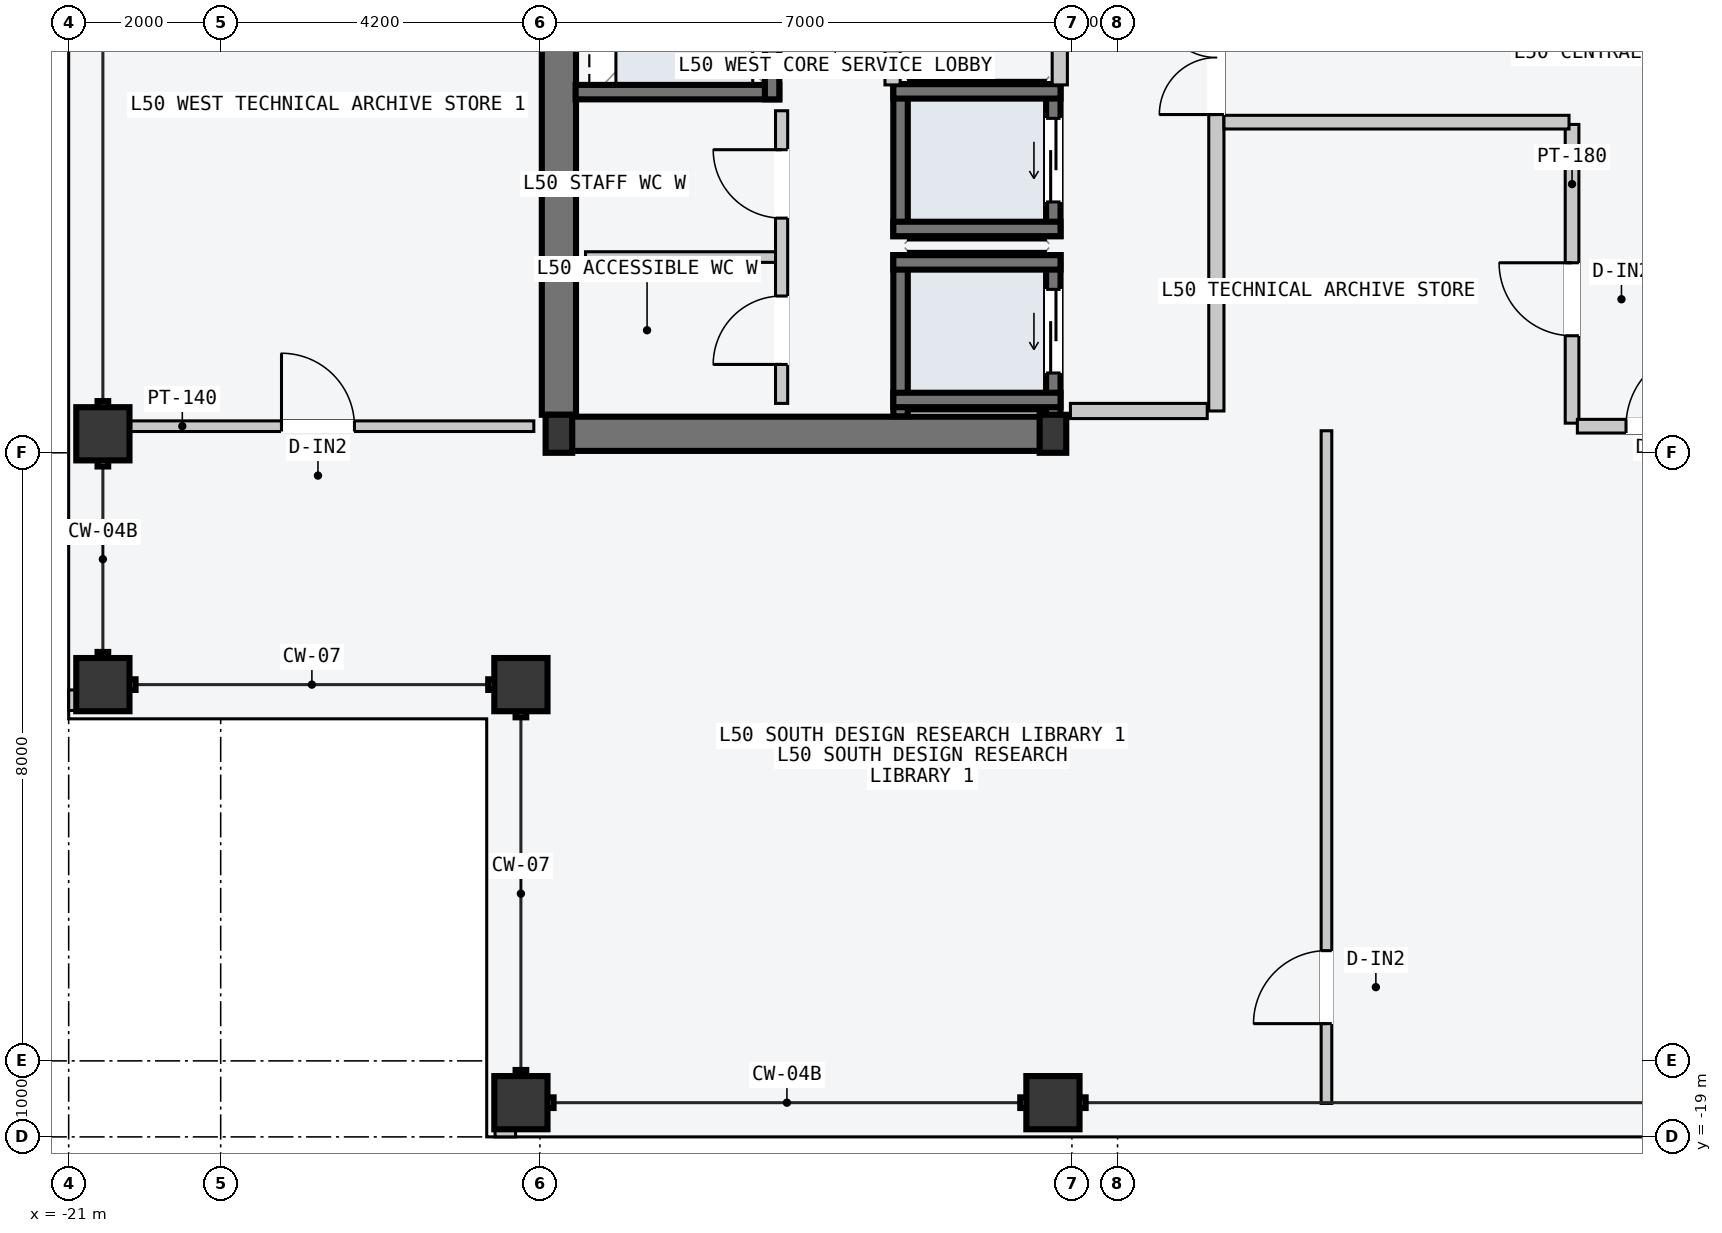
"""IFC4 building model, lengths in metres.
Left out: names, types, materials, properties, quantities, classifications, styles, units other than length and angle.
Written with IfcOpenShell. Run it as: python <this file> out.ifc"""

import sys

from ifc_helpers import new_model, si_unit, direction, frame, frame_2d, origin, origin_2d, place, context, subcontext, project, spatial, rectangle, hollow_rectangle, i_section, extrude, element, fill, save


model = new_model("IFC4")
c1 = context("Model", 3, precision=1e-05, world=origin(), true_north=direction((0.0, 1.0)))
c2 = subcontext(c1, "Body", "Model", "MODEL_VIEW")
j1 = project(units=[si_unit("LENGTHUNIT", "METRE"), si_unit("PLANEANGLEUNIT", "RADIAN")], contexts=[c1])
p1 = place(None, origin())
s1 = spatial("IfcSite", under=j1, at=p1, CompositionType="ELEMENT")
p2 = place(p1, origin())
s2 = spatial("IfcBuilding", under=s1, at=p2, CompositionType="ELEMENT")
p3 = place(p2, frame((0.0, 0.0, 191.1)))
s3 = spatial("IfcBuildingStorey", under=s2, at=p3, CompositionType="ELEMENT", Elevation=191.1)
p4 = place(p3, frame((-14.53, -9.75, -0.2), z_axis=(0.0, 0.0, 1.0), x_axis=(1.0, 0.0, 0.0)))
e1 = element("IfcWall", 1, at=p4, inside=s3, PredefinedType="SHEAR", context=c2, shape_type="SweptSolid", body=[
    extrude(rectangle(XDim=6.46, YDim=0.45, at=frame_2d((3.23, 0.0))), origin(), (0.0, 0.0, 1.0), 3.6),
])
p5 = place(p3, frame((-14.55, -9.5, -0.2), z_axis=(0.0, 0.0, 1.0), x_axis=(0.0, 1.0, 0.0)))
e2 = element("IfcWall", 2, at=p5, inside=s3, PredefinedType="SHEAR", context=c2, shape_type="SweptSolid", body=[
    extrude(rectangle(XDim=9.25, YDim=0.45, at=frame_2d((4.625, 0.0))), origin(), (0.0, 0.0, 1.0), 3.6),
])
for number, where, z_axis, x_axis in (
    (3, (-14.55, -9.75, 0.0), (0.0, 0.0, 1.0), (1.0, 0.0, 0.0)),
    (4, (-8.05, -9.75, 0.0), (0.0, 0.0, 1.0), (1.0, 0.0, 0.0)),
):
    element("IfcColumn", number, at=place(p3, frame(where, z_axis=z_axis, x_axis=x_axis)), inside=s3, PredefinedType="COLUMN", context=c2, shape_type="SweptSolid", body=[
        extrude(i_section(OverallWidth=0.35, OverallDepth=0.5, WebThickness=0.02, FlangeThickness=0.032, at=origin_2d()), origin(), (0.0, 0.0, 1.0), 3.6),
    ])
for number, where, z_axis, x_axis in (
    (5, (-15.05, -18.55, 0.0), (0.0, 0.0, 1.0), (1.0, 0.0, 0.0)),
    (6, (-8.05, -18.55, 0.0), (0.0, 0.0, 1.0), (1.0, 0.0, 0.0)),
    (7, (-20.55, -13.05, 0.0), (0.0, 0.0, 1.0), (0.0, 1.0, 0.0)),
    (8, (-20.55, -9.75, 0.0), (0.0, 0.0, 1.0), (0.0, 1.0, 0.0)),
    (9, (-15.05, -13.05, 0.0), (0.0, 0.0, 1.0), (1.0, 0.0, 0.0)),
):
    element("IfcColumn", number, at=place(p3, frame(where, z_axis=z_axis, x_axis=x_axis)), inside=s3, PredefinedType="COLUMN", context=c2, shape_type="SweptSolid", body=[
        extrude(hollow_rectangle(XDim=0.7, YDim=0.7, WallThickness=0.03, at=origin_2d()), origin(), (0.0, 0.0, 1.0), 3.6),
    ])
for number, where, z_axis, x_axis in (
    (10, (-15.39, -18.89, 0.0), (0.0, 0.0, 1.0), (1.0, 0.0, 0.0)),
    (11, (-20.89, -13.39, 0.0), (0.0, 0.0, 1.0), (0.0, 1.0, 0.0)),
):
    element("IfcWall", number, at=place(p3, frame(where, z_axis=z_axis, x_axis=x_axis)), inside=s3, PredefinedType="PARAPET", context=c2, shape_type="SweptSolid", body=[
        extrude(rectangle(XDim=0.27, YDim=0.22, at=frame_2d((0.135, 0.0))), origin(), (0.0, 0.0, 1.0), 1.2),
    ])
p6 = place(p3, frame((-8.045, -9.52, -0.2), z_axis=(0.0, 0.0, 1.0), x_axis=(0.0, 1.0, 0.0)))
e12 = element("IfcWall", 12, at=p6, inside=s3, PredefinedType="SOLIDWALL", context=c2, shape_type="SweptSolid", body=[
    extrude(rectangle(XDim=2.12, YDim=0.19, at=frame_2d((1.06, 0.0))), origin(), (0.0, 0.0, 1.0), 3.6),
])
p7 = place(p6, frame((0.57, 0.0, 0.2)))
e13 = element("IfcOpeningElement", 13, at=p7, cuts=e12, PredefinedType="OPENING", context=c2, shape_type="SweptSolid", body=[
    extrude(rectangle(XDim=1.1, YDim=2.2, at=frame_2d((0.55, 1.1))), frame((0.0, 0.105, 0.0), z_axis=(0.0, -1.0, 0.0), x_axis=(1.0, 0.0, 0.0)), (0.0, 0.0, 1.0), 0.21),
])
p8 = place(p3, frame((-10.055, -9.52, -0.2), z_axis=(0.0, 0.0, 1.0), x_axis=(0.0, 1.0, 0.0)))
e14 = element("IfcWall", 14, at=p8, inside=s3, PredefinedType="SOLIDWALL", context=c2, shape_type="SweptSolid", body=[
    extrude(rectangle(XDim=2.12, YDim=0.19, at=frame_2d((1.06, 0.0))), origin(), (0.0, 0.0, 1.0), 3.6),
])
for number, where, z_axis, x_axis in (
    (15, (-10.15, -7.495, -0.2), (0.0, 0.0, 1.0), (1.0, 0.0, 0.0)),
    (16, (-10.15, -9.305, -0.2), (0.0, 0.0, 1.0), (1.0, 0.0, 0.0)),
):
    element("IfcWall", number, at=place(p3, frame(where, z_axis=z_axis, x_axis=x_axis)), inside=s3, PredefinedType="SOLIDWALL", context=c2, shape_type="SweptSolid", body=[
        extrude(rectangle(XDim=2.2, YDim=0.19, at=frame_2d((1.1, 0.0))), origin(), (0.0, 0.0, 1.0), 3.6),
    ])
p9 = place(p3, frame((-8.045, -7.15, -0.2), z_axis=(0.0, 0.0, 1.0), x_axis=(0.0, 1.0, 0.0)))
e17 = element("IfcWall", 17, at=p9, inside=s3, PredefinedType="SOLIDWALL", context=c2, shape_type="SweptSolid", body=[
    extrude(rectangle(XDim=2.0, YDim=0.19, at=frame_2d((1.0, 0.0))), origin(), (0.0, 0.0, 1.0), 3.6),
])
p10 = place(p9, frame((0.45, 0.0, 0.2)))
e18 = element("IfcOpeningElement", 18, at=p10, cuts=e17, PredefinedType="OPENING", context=c2, shape_type="SweptSolid", body=[
    extrude(rectangle(XDim=1.1, YDim=2.2, at=frame_2d((0.55, 1.1))), frame((0.0, 0.105, 0.0), z_axis=(0.0, -1.0, 0.0), x_axis=(1.0, 0.0, 0.0)), (0.0, 0.0, 1.0), 0.21),
])
p11 = place(p3, frame((-10.055, -7.15, -0.2), z_axis=(0.0, 0.0, 1.0), x_axis=(0.0, 1.0, 0.0)))
e19 = element("IfcWall", 19, at=p11, inside=s3, PredefinedType="SOLIDWALL", context=c2, shape_type="SweptSolid", body=[
    extrude(rectangle(XDim=2.0, YDim=0.19, at=frame_2d((1.0, 0.0))), origin(), (0.0, 0.0, 1.0), 3.6),
])
for number, where, z_axis, x_axis in (
    (20, (-10.15, -5.245, -0.2), (0.0, 0.0, 1.0), (1.0, 0.0, 0.0)),
    (21, (-10.15, -7.055, -0.2), (0.0, 0.0, 1.0), (1.0, 0.0, 0.0)),
):
    element("IfcWall", number, at=place(p3, frame(where, z_axis=z_axis, x_axis=x_axis)), inside=s3, PredefinedType="SOLIDWALL", context=c2, shape_type="SweptSolid", body=[
        extrude(rectangle(XDim=2.2, YDim=0.19, at=frame_2d((1.1, 0.0))), origin(), (0.0, 0.0, 1.0), 3.6),
    ])
p12 = place(p3, frame((-14.33, -5.255, -0.2), z_axis=(0.0, 0.0, 1.0), x_axis=(1.0, 0.0, 0.0)))
e22 = element("IfcWall", 22, at=p12, inside=s3, PredefinedType="SOLIDWALL", context=c2, shape_type="SweptSolid", body=[
    extrude(rectangle(XDim=2.68, YDim=0.19, at=frame_2d((1.34, 0.0))), origin(), (0.0, 0.0, 1.0), 3.6),
])
p13 = place(p3, frame((-11.745, -5.35, -0.2), z_axis=(0.0, 0.0, 1.0), x_axis=(0.0, 1.0, 0.0)))
e23 = element("IfcWall", 23, at=p13, inside=s3, PredefinedType="SOLIDWALL", context=c2, shape_type="SweptSolid", body=[
    extrude(rectangle(XDim=2.6, YDim=0.19, at=frame_2d((1.3, 0.0))), origin(), (0.0, 0.0, 1.0), 3.6),
])
p14 = place(p3, frame((-5.9, -9.45, 0.0), z_axis=(0.0, 0.0, 1.0), x_axis=(0.0, 1.0, 0.0)))
e24 = element("IfcWall", 24, at=p14, inside=s3, PredefinedType="PARTITIONING", context=c2, shape_type="SweptSolid", body=[
    extrude(rectangle(XDim=10.5, YDim=0.2, at=frame_2d((5.25, 0.0))), origin(), (0.0, 0.0, 1.0), 3.4),
])
p15 = place(p14, frame((3.9, 0.0, 0.0)))
e25 = element("IfcOpeningElement", 25, at=p15, cuts=e24, PredefinedType="OPENING", context=c2, shape_type="SweptSolid", body=[
    extrude(rectangle(XDim=1.5, YDim=2.2, at=frame_2d((0.75, 1.1))), frame((0.0, 0.11, 0.0), z_axis=(0.0, -1.0, 0.0), x_axis=(1.0, 0.0, 0.0)), (0.0, 0.0, 1.0), 0.22),
])
p16 = place(p3, frame((-6.02, -9.45, 0.0), z_axis=(0.0, 0.0, 1.0), x_axis=(-1.0, 0.0, 0.0)))
e26 = element("IfcWall", 26, at=p16, inside=s3, PredefinedType="PARTITIONING", context=c2, shape_type="SweptSolid", body=[
    extrude(rectangle(XDim=1.8, YDim=0.2, at=frame_2d((0.9, 0.0))), origin(), (0.0, 0.0, 1.0), 3.4),
])
for number, where, z_axis, x_axis in (
    (27, (-7.96, -5.16, 0.0), (0.0, 0.0, 1.0), (0.0, 1.0, 0.0)),
    (28, (-10.16, -5.16, 0.0), (0.0, 0.0, 1.0), (0.0, 1.0, 0.0)),
):
    element("IfcWall", number, at=place(p3, frame(where, z_axis=z_axis, x_axis=x_axis)), inside=s3, PredefinedType="PARTITIONING", context=c2, shape_type="SweptSolid", body=[
        extrude(rectangle(XDim=2.44, YDim=0.2, at=frame_2d((1.22, 0.0))), origin(), (0.0, 0.0, 1.0), 3.4),
    ])
p17 = place(p3, frame((-11.7, -7.425, 0.0), z_axis=(0.0, 0.0, 1.0), x_axis=(-1.0, 0.0, 0.0)))
e29 = element("IfcWall", 29, at=p17, inside=s3, PredefinedType="PARTITIONING", context=c2, shape_type="SweptSolid", body=[
    extrude(rectangle(XDim=2.5, YDim=0.14, at=frame_2d((1.25, 0.0))), origin(), (0.0, 0.0, 1.0), 3.4),
])
p18 = place(p3, frame((-11.62, -9.35, 0.0), z_axis=(0.0, 0.0, 1.0), x_axis=(0.0, 1.0, 0.0)))
e30 = element("IfcWall", 30, at=p18, inside=s3, PredefinedType="PARTITIONING", context=c2, shape_type="SweptSolid", body=[
    extrude(rectangle(XDim=3.85, YDim=0.16, at=frame_2d((1.925, 0.0))), origin(), (0.0, 0.0, 1.0), 3.4),
])
p19 = place(p18, frame((0.512, 0.0, 0.0)))
e31 = element("IfcOpeningElement", 31, at=p19, cuts=e30, PredefinedType="OPENING", context=c2, shape_type="SweptSolid", body=[
    extrude(rectangle(XDim=0.9, YDim=2.15, at=frame_2d((0.45, 1.075))), frame((0.0, 0.09, 0.0), z_axis=(0.0, -1.0, 0.0), x_axis=(1.0, 0.0, 0.0)), (0.0, 0.0, 1.0), 0.18),
])
p20 = place(p18, frame((2.438, 0.0, 0.0)))
e32 = element("IfcOpeningElement", 32, at=p20, cuts=e30, PredefinedType="OPENING", context=c2, shape_type="SweptSolid", body=[
    extrude(rectangle(XDim=0.9, YDim=2.15, at=frame_2d((0.45, 1.075))), frame((0.0, 0.09, 0.0), z_axis=(0.0, -1.0, 0.0), x_axis=(1.0, 0.0, 0.0)), (0.0, 0.0, 1.0), 0.18),
])
p21 = place(p3, frame((-1.22, -9.61, 0.0), z_axis=(0.0, 0.0, 1.0), x_axis=(0.0, 1.0, 0.0)))
e33 = element("IfcWall", 33, at=p21, inside=s3, PredefinedType="PARTITIONING", context=c2, shape_type="SweptSolid", body=[
    extrude(rectangle(XDim=3.93, YDim=0.18, at=frame_2d((1.965, 0.0))), origin(), (0.0, 0.0, 1.0), 3.4),
])
p22 = place(p21, frame((1.15, 0.0, 0.0)))
e34 = element("IfcOpeningElement", 34, at=p22, cuts=e33, PredefinedType="OPENING", context=c2, shape_type="SweptSolid", body=[
    extrude(rectangle(XDim=0.96, YDim=2.18, at=frame_2d((0.48, 1.09))), frame((0.0, 0.1, 0.0), z_axis=(0.0, -1.0, 0.0), x_axis=(1.0, 0.0, 0.0)), (0.0, 0.0, 1.0), 0.2),
])
p23 = place(p3, frame((-5.8, -5.65, 0.0), z_axis=(0.0, 0.0, 1.0), x_axis=(1.0, 0.0, 0.0)))
e35 = element("IfcWall", 35, at=p23, inside=s3, PredefinedType="PARTITIONING", context=c2, shape_type="SweptSolid", body=[
    extrude(rectangle(XDim=4.54, YDim=0.18, at=frame_2d((2.27, 0.0))), origin(), (0.0, 0.0, 1.0), 3.4),
])
p24 = place(p3, frame((-4.451, -18.56, 0.0), z_axis=(0.0, 0.0, 1.0), x_axis=(0.0, 1.0, 0.0)))
e36 = element("IfcWall", 36, at=p24, inside=s3, PredefinedType="PARTITIONING", context=c2, shape_type="SweptSolid", body=[
    extrude(rectangle(XDim=8.85, YDim=0.14, at=frame_2d((4.425, 0.0))), origin(), (0.0, 0.0, 1.0), 3.4),
])
p25 = place(p24, frame((1.05, 0.0, 0.0)))
e37 = element("IfcOpeningElement", 37, at=p25, cuts=e36, PredefinedType="OPENING", context=c2, shape_type="SweptSolid", body=[
    extrude(rectangle(XDim=0.96, YDim=2.18, at=frame_2d((0.48, 1.09))), frame((0.0, 0.08, 0.0), z_axis=(0.0, -1.0, 0.0), x_axis=(1.0, 0.0, 0.0)), (0.0, 0.0, 1.0), 0.16),
])
p26 = place(p3, frame((-1.15, -9.65, 0.0), z_axis=(0.0, 0.0, 1.0), x_axis=(1.0, 0.0, 0.0)))
e38 = element("IfcWall", 38, at=p26, inside=s3, PredefinedType="PARTITIONING", context=c2, shape_type="SweptSolid", body=[
    extrude(rectangle(XDim=2.3, YDim=0.18, at=frame_2d((1.15, 0.0))), origin(), (0.0, 0.0, 1.0), 2.75),
])
p27 = place(p26, frame((0.64, 0.0, 0.0)))
e39 = element("IfcOpeningElement", 39, at=p27, cuts=e38, PredefinedType="OPENING", context=c2, shape_type="SweptSolid", body=[
    extrude(rectangle(XDim=1.02, YDim=2.2, at=frame_2d((0.51, 1.1))), frame((0.0, 0.1, 0.0), z_axis=(0.0, -1.0, 0.0), x_axis=(1.0, 0.0, 0.0)), (0.0, 0.0, 1.0), 0.2),
])
p28 = place(p3, frame((-20.56, -9.65, 0.0), z_axis=(0.0, 0.0, 1.0), x_axis=(1.0, 0.0, 0.0)))
e40 = element("IfcWall", 40, at=p28, inside=s3, PredefinedType="PARTITIONING", context=c2, shape_type="SweptSolid", body=[
    extrude(rectangle(XDim=5.68, YDim=0.14, at=frame_2d((2.84, 0.0))), origin(), (0.0, 0.0, 1.0), 2.75),
])
p29 = place(p28, frame((2.36, 0.0, 0.0)))
e41 = element("IfcOpeningElement", 41, at=p29, cuts=e40, PredefinedType="OPENING", context=c2, shape_type="SweptSolid", body=[
    extrude(rectangle(XDim=0.96, YDim=2.18, at=frame_2d((0.48, 1.09))), frame((0.0, 0.08, 0.0), z_axis=(0.0, -1.0, 0.0), x_axis=(1.0, 0.0, 0.0)), (0.0, 0.0, 1.0), 0.16),
])
p30 = place(p7, origin())
e42 = element("IfcDoor", 42, at=p30, inside=s3, OperationType="SLIDING_TO_LEFT", PredefinedType="DOOR", context=c2, shape_type="SweptSolid", body=[
    extrude(rectangle(XDim=1.1, YDim=2.2, at=frame_2d((0.55, 1.1))), frame((0.0, 0.025, 0.0), z_axis=(0.0, -1.0, 0.0), x_axis=(1.0, 0.0, 0.0)), (0.0, 0.0, 1.0), 0.05),
])
fill(e13, e42)
p31 = place(p10, origin())
e43 = element("IfcDoor", 43, at=p31, inside=s3, OperationType="SLIDING_TO_LEFT", PredefinedType="DOOR", context=c2, shape_type="SweptSolid", body=[
    extrude(rectangle(XDim=1.1, YDim=2.2, at=frame_2d((0.55, 1.1))), frame((0.0, 0.025, 0.0), z_axis=(0.0, -1.0, 0.0), x_axis=(1.0, 0.0, 0.0)), (0.0, 0.0, 1.0), 0.05),
])
fill(e18, e43)
p32 = place(p15, origin())
e44 = element("IfcDoor", 44, at=p32, inside=s3, OperationType="DOUBLE_DOOR_SINGLE_SWING", PredefinedType="DOOR", context=c2, shape_type="SweptSolid", body=[
    extrude(rectangle(XDim=1.5, YDim=2.2, at=frame_2d((0.75, 1.1))), frame((0.0, 0.025, 0.0), z_axis=(0.0, -1.0, 0.0), x_axis=(1.0, 0.0, 0.0)), (0.0, 0.0, 1.0), 0.05),
])
fill(e25, e44)
p33 = place(p19, origin())
e45 = element("IfcDoor", 45, at=p33, inside=s3, OperationType="SINGLE_SWING_LEFT", PredefinedType="DOOR", context=c2, shape_type="SweptSolid", body=[
    extrude(rectangle(XDim=0.9, YDim=2.15, at=frame_2d((0.45, 1.075))), frame((0.0, 0.025, 0.0), z_axis=(0.0, -1.0, 0.0), x_axis=(1.0, 0.0, 0.0)), (0.0, 0.0, 1.0), 0.05),
])
fill(e31, e45)
p34 = place(p20, origin())
e46 = element("IfcDoor", 46, at=p34, inside=s3, OperationType="SINGLE_SWING_RIGHT", PredefinedType="DOOR", context=c2, shape_type="SweptSolid", body=[
    extrude(rectangle(XDim=0.9, YDim=2.15, at=frame_2d((0.45, 1.075))), frame((0.0, 0.025, 0.0), z_axis=(0.0, -1.0, 0.0), x_axis=(1.0, 0.0, 0.0)), (0.0, 0.0, 1.0), 0.05),
])
fill(e32, e46)
p35 = place(p22, origin())
e47 = element("IfcDoor", 47, at=p35, inside=s3, OperationType="SINGLE_SWING_RIGHT", PredefinedType="DOOR", context=c2, shape_type="SweptSolid", body=[
    extrude(rectangle(XDim=0.96, YDim=2.18, at=frame_2d((0.48, 1.09))), frame((0.0, 0.025, 0.0), z_axis=(0.0, -1.0, 0.0), x_axis=(1.0, 0.0, 0.0)), (0.0, 0.0, 1.0), 0.05),
])
fill(e34, e47)
p36 = place(p25, origin())
e48 = element("IfcDoor", 48, at=p36, inside=s3, OperationType="SINGLE_SWING_LEFT", PredefinedType="DOOR", context=c2, shape_type="SweptSolid", body=[
    extrude(rectangle(XDim=0.96, YDim=2.18, at=frame_2d((0.48, 1.09))), frame((0.0, 0.025, 0.0), z_axis=(0.0, -1.0, 0.0), x_axis=(1.0, 0.0, 0.0)), (0.0, 0.0, 1.0), 0.05),
])
fill(e37, e48)
p37 = place(p27, origin())
e49 = element("IfcDoor", 49, at=p37, inside=s3, OperationType="SINGLE_SWING_RIGHT", PredefinedType="DOOR", context=c2, shape_type="SweptSolid", body=[
    extrude(rectangle(XDim=1.02, YDim=2.2, at=frame_2d((0.51, 1.1))), frame((0.0, 0.025, 0.0), z_axis=(0.0, -1.0, 0.0), x_axis=(1.0, 0.0, 0.0)), (0.0, 0.0, 1.0), 0.05),
])
fill(e39, e49)
p38 = place(p29, origin())
e50 = element("IfcDoor", 50, at=p38, inside=s3, OperationType="SINGLE_SWING_LEFT", PredefinedType="DOOR", context=c2, shape_type="SweptSolid", body=[
    extrude(rectangle(XDim=0.96, YDim=2.18, at=frame_2d((0.48, 1.09))), frame((0.0, 0.025, 0.0), z_axis=(0.0, -1.0, 0.0), x_axis=(1.0, 0.0, 0.0)), (0.0, 0.0, 1.0), 0.05),
])
fill(e41, e50)
save(model, sys.argv[1])
